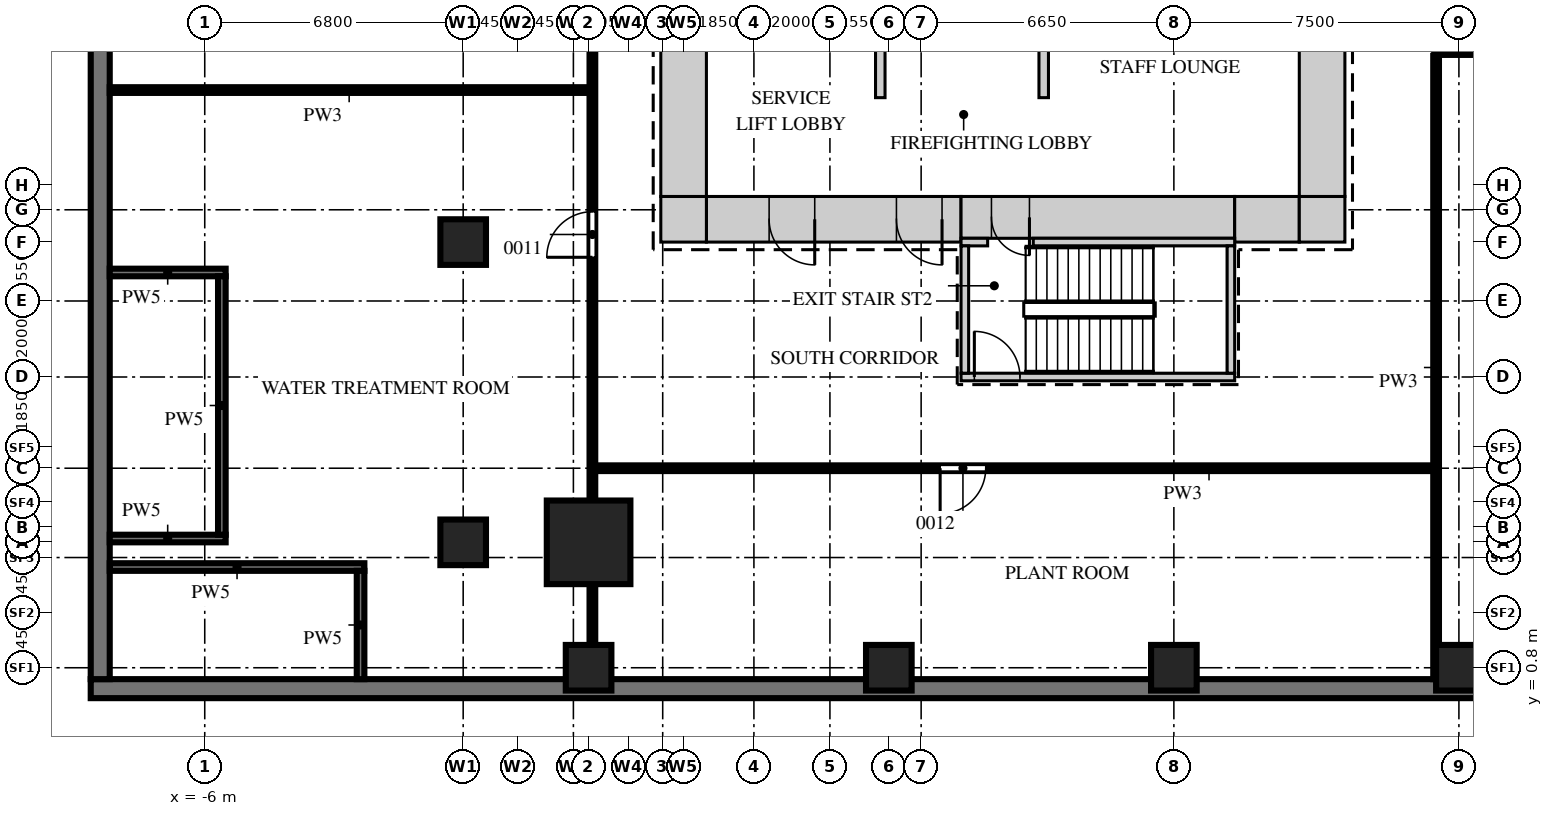
"""IFC4 building model, lengths in metres.
Left out: names, types, materials, properties, quantities, classifications, styles, units other than length and angle.
Written with IfcOpenShell. Run it as: python <this file> out.ifc"""

import sys

from ifc_helpers import new_model, si_unit, direction, frame, frame_2d, origin, origin_2d, place, context, subcontext, project, spatial, rectangle, extrude, source, transform, mapped, element, fill, save


model = new_model("IFC4")
c1 = context("Model", 3, precision=1e-05, world=origin(), true_north=direction((0.0, 1.0)))
c2 = subcontext(c1, "Body", "Model", "MODEL_VIEW")
j1 = project(units=[si_unit("LENGTHUNIT", "METRE"), si_unit("PLANEANGLEUNIT", "RADIAN")], contexts=[c1])
p1 = place(None, origin())
s1 = spatial("IfcSite", under=j1, at=p1, CompositionType="ELEMENT")
p2 = place(p1, origin())
s2 = spatial("IfcBuilding", under=s1, at=p2, CompositionType="ELEMENT")
p3 = place(p2, frame((0.0, 0.0, -9.0)))
s3 = spatial("IfcBuildingStorey", under=s2, at=p3, CompositionType="ELEMENT", Elevation=-9.0)
m1 = source(origin(), c2, "Body", "SweptSolid", [
    extrude(rectangle(XDim=6.7, YDim=1.2, at=frame_2d((3.35, 0.0))), origin(), (0.0, 0.0, 1.0), 4.2),
])
p4 = place(p3, frame((7.2, 12.6, 0.0), z_axis=(0.0, 0.0, 1.0), x_axis=(1.0, 0.0, 0.0)))
e1 = element("IfcWall", 1, at=p4, inside=s3, PredefinedType="SHEAR", context=c2, shape_type="MappedRepresentation", body=[
    mapped(m1, transform((0.0, 0.0, 0.0))),
])
m2 = source(origin(), c2, "Body", "SweptSolid", [
    extrude(rectangle(XDim=1.2, YDim=2.1, at=frame_2d((0.6, 1.05))), frame((0.0, 0.61, 0.0), z_axis=(0.0, -1.0, 0.0), x_axis=(1.0, 0.0, 0.0)), (0.0, 0.0, 1.0), 1.22),
])
p5 = place(p4, frame((5.0, 0.0, 0.0)))
e2 = element("IfcOpeningElement", 2, at=p5, cuts=e1, PredefinedType="OPENING", context=c2, shape_type="MappedRepresentation", body=[
    mapped(m2, transform((0.0, 0.0, 0.0))),
])
p6 = place(p4, frame((1.65, 0.0, 0.0)))
e3 = element("IfcOpeningElement", 3, at=p6, cuts=e1, PredefinedType="OPENING", context=c2, shape_type="MappedRepresentation", body=[
    mapped(m2, transform((0.0, 0.0, 0.0))),
])
m3 = source(origin(), c2, "Body", "SweptSolid", [
    extrude(rectangle(XDim=7.2, YDim=1.1, at=frame_2d((3.6, 0.0))), origin(), (0.0, 0.0, 1.0), 4.2),
])
p7 = place(p3, frame((13.9, 12.65, 0.0), z_axis=(0.0, 0.0, 1.0), x_axis=(1.0, 0.0, 0.0)))
e4 = element("IfcWall", 4, at=p7, inside=s3, PredefinedType="SHEAR", context=c2, shape_type="MappedRepresentation", body=[
    mapped(m3, transform((0.0, 0.0, 0.0))),
])
m4 = source(origin(), c2, "Body", "SweptSolid", [
    extrude(rectangle(XDim=1.0, YDim=2.1, at=frame_2d((0.5, 1.05))), frame((0.0, 0.56, 0.0), z_axis=(0.0, -1.0, 0.0), x_axis=(1.0, 0.0, 0.0)), (0.0, 0.0, 1.0), 1.12),
])
p8 = place(p7, frame((0.8, 0.0, 0.0)))
e5 = element("IfcOpeningElement", 5, at=p8, cuts=e4, PredefinedType="OPENING", context=c2, shape_type="MappedRepresentation", body=[
    mapped(m4, transform((0.0, 0.0, 0.0))),
])
m5 = source(origin(), c2, "Body", "SweptSolid", [
    extrude(rectangle(XDim=1.7, YDim=1.2, at=frame_2d((0.85, 0.0))), origin(), (0.0, 0.0, 1.0), 4.2),
])
p9 = place(p3, frame((21.1, 12.6, 0.0), z_axis=(0.0, 0.0, 1.0), x_axis=(1.0, 0.0, 0.0)))
e6 = element("IfcWall", 6, at=p9, inside=s3, PredefinedType="SHEAR", context=c2, shape_type="MappedRepresentation", body=[
    mapped(m5, transform((0.0, 0.0, 0.0))),
])
m6 = source(origin(), c2, "Body", "SweptSolid", [
    extrude(rectangle(XDim=1.2, YDim=1.2, at=frame_2d((0.6, 0.0))), origin(), (0.0, 0.0, 1.0), 4.2),
])
for number, where, z_axis, x_axis in (
    (7, (22.8, 12.6, 0.0), (0.0, 0.0, 1.0), (1.0, 0.0, 0.0)),
    (8, (6.0, 12.6, 0.0), (0.0, 0.0, 1.0), (1.0, 0.0, 0.0)),
):
    element("IfcWall", number, at=place(p3, frame(where, z_axis=z_axis, x_axis=x_axis)), inside=s3, PredefinedType="SHEAR", context=c2, shape_type="MappedRepresentation", body=[
        mapped(m6, transform((0.0, 0.0, 0.0))),
    ])
m7 = source(origin(), c2, "Body", "SweptSolid", [
    extrude(rectangle(XDim=27.6, YDim=1.2, at=frame_2d((13.8, 0.0))), origin(), (0.0, 0.0, 1.0), 4.2),
])
p10 = place(p3, frame((23.4, 13.2, 0.0), z_axis=(0.0, 0.0, 1.0), x_axis=(0.0, 1.0, 0.0)))
e9 = element("IfcWall", 9, at=p10, inside=s3, PredefinedType="SHEAR", context=c2, shape_type="MappedRepresentation", body=[
    mapped(m7, transform((0.0, 0.0, 0.0))),
])
p11 = place(p10, frame((12.15, 0.0, 0.0)))
e10 = element("IfcOpeningElement", 10, at=p11, cuts=e9, PredefinedType="OPENING", context=c2, shape_type="MappedRepresentation", body=[
    mapped(m2, transform((0.0, 0.0, 0.0))),
])
m8 = source(origin(), c2, "Body", "SweptSolid", [
    extrude(rectangle(XDim=0.9, YDim=2.1, at=frame_2d((0.45, 1.05))), frame((0.0, 0.61, 0.0), z_axis=(0.0, -1.0, 0.0), x_axis=(1.0, 0.0, 0.0)), (0.0, 0.0, 1.0), 1.22),
])
p12 = place(p10, frame((4.4, 0.0, 0.0)))
e11 = element("IfcOpeningElement", 11, at=p12, cuts=e9, PredefinedType="OPENING", context=c2, shape_type="MappedRepresentation", body=[
    mapped(m8, transform((0.0, 0.0, 0.0))),
])
p13 = place(p3, frame((6.6, 13.2, 0.0), z_axis=(0.0, 0.0, 1.0), x_axis=(0.0, 1.0, 0.0)))
e12 = element("IfcWall", 12, at=p13, inside=s3, PredefinedType="SHEAR", context=c2, shape_type="MappedRepresentation", body=[
    mapped(m7, transform((0.0, 0.0, 0.0))),
])
m9 = source(origin(), c2, "Body", "SweptSolid", [
    extrude(rectangle(XDim=0.7, YDim=0.2, at=frame_2d((0.35, 0.0))), origin(), (0.0, 0.0, 1.0), 4.2),
])
p14 = place(p3, frame((13.9, 12.0, 0.0), z_axis=(0.0, 0.0, 1.0), x_axis=(1.0, 0.0, 0.0)))
e13 = element("IfcWall", 13, at=p14, inside=s3, PredefinedType="SHEAR", context=c2, shape_type="MappedRepresentation", body=[
    mapped(m9, transform((0.0, 0.0, 0.0))),
])
m10 = source(origin(), c2, "Body", "SweptSolid", [
    extrude(rectangle(XDim=5.3, YDim=0.2, at=frame_2d((2.65, 0.0))), origin(), (0.0, 0.0, 1.0), 4.2),
])
p15 = place(p3, frame((15.8, 12.0, 0.0), z_axis=(0.0, 0.0, 1.0), x_axis=(1.0, 0.0, 0.0)))
e14 = element("IfcWall", 14, at=p15, inside=s3, PredefinedType="SHEAR", context=c2, shape_type="MappedRepresentation", body=[
    mapped(m10, transform((0.0, 0.0, 0.0))),
])
m11 = source(origin(), c2, "Body", "SweptSolid", [
    extrude(rectangle(XDim=7.2, YDim=0.2, at=frame_2d((3.6, 0.0))), origin(), (0.0, 0.0, 1.0), 4.2),
])
p16 = place(p3, frame((13.9, 8.45, 0.0), z_axis=(0.0, 0.0, 1.0), x_axis=(1.0, 0.0, 0.0)))
e15 = element("IfcWall", 15, at=p16, inside=s3, PredefinedType="SHEAR", context=c2, shape_type="MappedRepresentation", body=[
    mapped(m11, transform((0.0, 0.0, 0.0))),
])
m12 = source(origin(), c2, "Body", "SweptSolid", [
    extrude(rectangle(XDim=1.2, YDim=2.1, at=frame_2d((0.6, 1.05))), frame((0.0, 0.11, 0.0), z_axis=(0.0, -1.0, 0.0), x_axis=(1.0, 0.0, 0.0)), (0.0, 0.0, 1.0), 0.22),
])
p17 = place(p16, frame((0.35, 0.0, 0.0)))
e16 = element("IfcOpeningElement", 16, at=p17, cuts=e15, PredefinedType="OPENING", context=c2, shape_type="MappedRepresentation", body=[
    mapped(m12, transform((0.0, 0.0, 0.0))),
])
m13 = source(origin(), c2, "Body", "SweptSolid", [
    extrude(rectangle(XDim=3.35, YDim=0.2, at=frame_2d((1.675, 0.0))), origin(), (0.0, 0.0, 1.0), 4.2),
])
for number, where, z_axis, x_axis in (
    (17, (21.0, 8.55, 0.0), (0.0, 0.0, 1.0), (0.0, 1.0, 0.0)),
    (18, (14.0, 8.55, 0.0), (0.0, 0.0, 1.0), (0.0, 1.0, 0.0)),
):
    element("IfcWall", number, at=place(p3, frame(where, z_axis=z_axis, x_axis=x_axis)), inside=s3, PredefinedType="SHEAR", context=c2, shape_type="MappedRepresentation", body=[
        mapped(m13, transform((0.0, 0.0, 0.0))),
    ])
m14 = source(origin(), c2, "Body", "SweptSolid", [
    extrude(rectangle(XDim=3.4, YDim=0.25, at=frame_2d((1.7, 0.0))), origin(), (0.0, 0.0, 1.0), 4.2),
])
for number, where, z_axis, x_axis in (
    (19, (16.075, 15.8, 0.0), (0.0, 0.0, 1.0), (0.0, 1.0, 0.0)),
    (20, (11.775, 15.8, 0.0), (0.0, 0.0, 1.0), (0.0, 1.0, 0.0)),
):
    element("IfcWall", number, at=place(p3, frame(where, z_axis=z_axis, x_axis=x_axis)), inside=s3, PredefinedType="STANDARD", context=c2, shape_type="MappedRepresentation", body=[
        mapped(m14, transform((0.0, 0.0, 0.0))),
    ])
m15 = source(origin(), c2, "Body", "SweptSolid", [
    extrude(rectangle(XDim=90.0, YDim=0.5, at=frame_2d((45.0, 0.0))), origin(), (0.0, 0.0, 1.0), 4.2),
])
p18 = place(p3, frame((-9.0, 0.25, 0.0), z_axis=(0.0, 0.0, 1.0), x_axis=(1.0, 0.0, 0.0)))
e21 = element("IfcWall", 21, at=p18, inside=s3, PredefinedType="STANDARD", context=c2, shape_type="MappedRepresentation", body=[
    mapped(m15, transform((0.0, 0.0, 0.0))),
])
m16 = source(origin(), c2, "Body", "SweptSolid", [
    extrude(rectangle(XDim=53.0, YDim=0.5, at=frame_2d((26.5, 0.0))), origin(), (0.0, 0.0, 1.0), 4.2),
])
p19 = place(p3, frame((-8.75, 0.5, 0.0), z_axis=(0.0, 0.0, 1.0), x_axis=(0.0, 1.0, 0.0)))
e22 = element("IfcWall", 22, at=p19, inside=s3, PredefinedType="STANDARD", context=c2, shape_type="MappedRepresentation", body=[
    mapped(m16, transform((0.0, 0.0, 0.0))),
])
m17 = source(origin(), c2, "Body", "SweptSolid", [
    extrude(rectangle(XDim=2.2, YDim=2.2, at=origin_2d()), origin(), (0.0, 0.0, 1.0), 4.5),
])
p20 = place(p3, frame((4.1, 4.1, 0.0), z_axis=(0.0, 0.0, 1.0), x_axis=(1.0, 0.0, 0.0)))
e23 = element("IfcColumn", 23, at=p20, inside=s3, PredefinedType="COLUMN", context=c2, shape_type="MappedRepresentation", body=[
    mapped(m17, transform((0.0, 0.0, 0.0))),
])
m18 = source(origin(), c2, "Body", "SweptSolid", [
    extrude(rectangle(XDim=1.2, YDim=1.2, at=origin_2d()), origin(), (0.0, 0.0, 1.0), 4.2),
])
for number, where, z_axis, x_axis in (
    (24, (4.1, 0.8, 0.0), (0.0, 0.0, 1.0), (1.0, 0.0, 0.0)),
    (25, (12.0, 0.8, 0.0), (0.0, 0.0, 1.0), (1.0, 0.0, 0.0)),
    (26, (19.5, 0.8, 0.0), (0.0, 0.0, 1.0), (1.0, 0.0, 0.0)),
    (27, (27.0, 0.8, 0.0), (0.0, 0.0, 1.0), (1.0, 0.0, 0.0)),
    (28, (0.8, 4.1, 0.0), (0.0, 0.0, 1.0), (1.0, 0.0, 0.0)),
    (29, (0.8, 12.0, 0.0), (0.0, 0.0, 1.0), (1.0, 0.0, 0.0)),
):
    element("IfcColumn", number, at=place(p3, frame(where, z_axis=z_axis, x_axis=x_axis)), inside=s3, PredefinedType="COLUMN", context=c2, shape_type="MappedRepresentation", body=[
        mapped(m18, transform((0.0, 0.0, 0.0))),
    ])
m19 = source(origin(), c2, "Body", "SweptSolid", [
    extrude(rectangle(XDim=53.0, YDim=0.15, at=frame_2d((26.5, 0.0))), origin(), (0.0, 0.0, 1.0), 4.2),
])
p21 = place(p3, frame((4.2, 0.5, 0.0), z_axis=(0.0, 0.0, 1.0), x_axis=(0.0, 1.0, 0.0)))
e30 = element("IfcWall", 30, at=p21, inside=s3, PredefinedType="PARTITIONING", context=c2, shape_type="MappedRepresentation", body=[
    mapped(m19, transform((0.0, 0.0, 0.0))),
])
m20 = source(origin(), c2, "Body", "SweptSolid", [
    extrude(rectangle(XDim=1.2, YDim=2.1, at=frame_2d((0.6, 1.05))), frame((0.0, 0.085, 0.0), z_axis=(0.0, -1.0, 0.0), x_axis=(1.0, 0.0, 0.0)), (0.0, 0.0, 1.0), 0.17),
])
p22 = place(p21, frame((11.1, 0.0, 0.0)))
e31 = element("IfcOpeningElement", 31, at=p22, cuts=e30, PredefinedType="OPENING", context=c2, shape_type="MappedRepresentation", body=[
    mapped(m20, transform((0.0, 0.0, 0.0))),
])
p23 = place(p21, frame((23.9, 0.0, 0.0)))
e32 = element("IfcOpeningElement", 32, at=p23, cuts=e30, PredefinedType="OPENING", context=c2, shape_type="MappedRepresentation", body=[
    mapped(m20, transform((0.0, 0.0, 0.0))),
])
p24 = place(p21, frame((38.7, 0.0, 0.0)))
e33 = element("IfcOpeningElement", 33, at=p24, cuts=e30, PredefinedType="OPENING", context=c2, shape_type="MappedRepresentation", body=[
    mapped(m20, transform((0.0, 0.0, 0.0))),
])
m21 = source(origin(), c2, "Body", "SweptSolid", [
    extrude(rectangle(XDim=16.4, YDim=0.15, at=frame_2d((8.2, 0.0))), origin(), (0.0, 0.0, 1.0), 4.2),
])
p25 = place(p3, frame((26.4, 0.5, 0.0), z_axis=(0.0, 0.0, 1.0), x_axis=(0.0, 1.0, 0.0)))
e34 = element("IfcWall", 34, at=p25, inside=s3, PredefinedType="PARTITIONING", context=c2, shape_type="MappedRepresentation", body=[
    mapped(m21, transform((0.0, 0.0, 0.0))),
])
m22 = source(origin(), c2, "Body", "SweptSolid", [
    extrude(rectangle(XDim=22.0, YDim=0.15, at=frame_2d((11.0, 0.0))), origin(), (0.0, 0.0, 1.0), 4.2),
])
p26 = place(p3, frame((4.3, 6.05, 0.0), z_axis=(0.0, 0.0, 1.0), x_axis=(1.0, 0.0, 0.0)))
e35 = element("IfcWall", 35, at=p26, inside=s3, PredefinedType="PARTITIONING", context=c2, shape_type="MappedRepresentation", body=[
    mapped(m22, transform((0.0, 0.0, 0.0))),
])
p27 = place(p26, frame((9.05, 0.0, 0.0)))
e36 = element("IfcOpeningElement", 36, at=p27, cuts=e35, PredefinedType="OPENING", context=c2, shape_type="MappedRepresentation", body=[
    mapped(m20, transform((0.0, 0.0, 0.0))),
])
m23 = source(origin(), c2, "Body", "SweptSolid", [
    extrude(rectangle(XDim=12.6, YDim=0.15, at=frame_2d((6.3, 0.0))), origin(), (0.0, 0.0, 1.0), 4.2),
])
p28 = place(p3, frame((-8.5, 16.0, 0.0), z_axis=(0.0, 0.0, 1.0), x_axis=(1.0, 0.0, 0.0)))
e37 = element("IfcWall", 37, at=p28, inside=s3, PredefinedType="PARTITIONING", context=c2, shape_type="MappedRepresentation", body=[
    mapped(m23, transform((0.0, 0.0, 0.0))),
])
m24 = source(origin(), c2, "Body", "SweptSolid", [
    extrude(rectangle(XDim=54.15, YDim=0.15, at=frame_2d((27.075, 0.0))), origin(), (0.0, 0.0, 1.0), 4.2),
])
p29 = place(p3, frame((26.35, 17.0, 0.0), z_axis=(0.0, 0.0, 1.0), x_axis=(1.0, 0.0, 0.0)))
e38 = element("IfcWall", 38, at=p29, inside=s3, PredefinedType="PARTITIONING", context=c2, shape_type="MappedRepresentation", body=[
    mapped(m24, transform((0.0, 0.0, 0.0))),
])
p30 = place(p29, frame((6.25, 0.0, 0.0)))
e39 = element("IfcOpeningElement", 39, at=p30, cuts=e38, PredefinedType="OPENING", context=c2, shape_type="MappedRepresentation", body=[
    mapped(m20, transform((0.0, 0.0, 0.0))),
])
p31 = place(p29, frame((19.05, 0.0, 0.0)))
e40 = element("IfcOpeningElement", 40, at=p31, cuts=e38, PredefinedType="OPENING", context=c2, shape_type="MappedRepresentation", body=[
    mapped(m20, transform((0.0, 0.0, 0.0))),
])
p32 = place(p29, frame((31.05, 0.0, 0.0)))
e41 = element("IfcOpeningElement", 41, at=p32, cuts=e38, PredefinedType="OPENING", context=c2, shape_type="MappedRepresentation", body=[
    mapped(m20, transform((0.0, 0.0, 0.0))),
])
m25 = source(origin(), c2, "Body", "SweptSolid", [
    extrude(rectangle(XDim=0.9, YDim=2.1, at=frame_2d((0.45, 1.05))), frame((0.0, 0.085, 0.0), z_axis=(0.0, -1.0, 0.0), x_axis=(1.0, 0.0, 0.0)), (0.0, 0.0, 1.0), 0.17),
])
p33 = place(p29, frame((39.85, 0.0, 0.0)))
e42 = element("IfcOpeningElement", 42, at=p33, cuts=e38, PredefinedType="OPENING", context=c2, shape_type="MappedRepresentation", body=[
    mapped(m25, transform((0.0, 0.0, 0.0))),
])
p34 = place(p29, frame((48.2, 0.0, 0.0)))
e43 = element("IfcOpeningElement", 43, at=p34, cuts=e38, PredefinedType="OPENING", context=c2, shape_type="MappedRepresentation", body=[
    mapped(m20, transform((0.0, 0.0, 0.0))),
])
m26 = source(origin(), c2, "Body", "SweptSolid", [
    extrude(rectangle(XDim=6.7, YDim=0.2, at=frame_2d((3.35, 0.0))), origin(), (0.0, 0.0, 1.0), 4.2),
])
p35 = place(p3, frame((-8.5, 3.45, 0.0), z_axis=(0.0, 0.0, 1.0), x_axis=(1.0, 0.0, 0.0)))
e44 = element("IfcWall", 44, at=p35, inside=s3, PredefinedType="PARTITIONING", context=c2, shape_type="MappedRepresentation", body=[
    mapped(m26, transform((0.0, 0.0, 0.0))),
])
m27 = source(origin(), c2, "Body", "SweptSolid", [
    extrude(rectangle(XDim=2.85, YDim=0.2, at=frame_2d((1.425, 0.0))), origin(), (0.0, 0.0, 1.0), 4.2),
])
p36 = place(p3, frame((-1.9, 0.5, 0.0), z_axis=(0.0, 0.0, 1.0), x_axis=(0.0, 1.0, 0.0)))
e45 = element("IfcWall", 45, at=p36, inside=s3, PredefinedType="PARTITIONING", context=c2, shape_type="MappedRepresentation", body=[
    mapped(m27, transform((0.0, 0.0, 0.0))),
])
m28 = source(origin(), c2, "Body", "SweptSolid", [
    extrude(rectangle(XDim=3.05, YDim=0.2, at=frame_2d((1.525, 0.0))), origin(), (0.0, 0.0, 1.0), 4.2),
])
for number, where, z_axis, x_axis in (
    (46, (-8.5, 4.2, 0.0), (0.0, 0.0, 1.0), (1.0, 0.0, 0.0)),
    (47, (-8.5, 11.2, 0.0), (0.0, 0.0, 1.0), (1.0, 0.0, 0.0)),
):
    element("IfcWall", number, at=place(p3, frame(where, z_axis=z_axis, x_axis=x_axis)), inside=s3, PredefinedType="PARTITIONING", context=c2, shape_type="MappedRepresentation", body=[
        mapped(m28, transform((0.0, 0.0, 0.0))),
    ])
m29 = source(origin(), c2, "Body", "SweptSolid", [
    extrude(rectangle(XDim=6.8, YDim=0.2, at=frame_2d((3.4, 0.0))), origin(), (0.0, 0.0, 1.0), 4.2),
])
p37 = place(p3, frame((-5.55, 4.3, 0.0), z_axis=(0.0, 0.0, 1.0), x_axis=(0.0, 1.0, 0.0)))
e48 = element("IfcWall", 48, at=p37, inside=s3, PredefinedType="PARTITIONING", context=c2, shape_type="MappedRepresentation", body=[
    mapped(m29, transform((0.0, 0.0, 0.0))),
])
m30 = source(origin(), c2, "Body", "SweptSolid", [
    extrude(rectangle(XDim=1.2, YDim=2.1, at=frame_2d((0.6, 1.05))), frame((0.0, 0.55, 0.0), z_axis=(0.0, -1.0, 0.0), x_axis=(1.0, 0.0, 0.0)), (0.0, 0.0, 1.0), 1.1),
])
p38 = place(p5, origin())
e49 = element("IfcDoor", 49, at=p38, inside=s3, OperationType="SINGLE_SWING_RIGHT", PredefinedType="DOOR", context=c2, shape_type="MappedRepresentation", body=[
    mapped(m30, transform((0.0, 0.0, 0.0))),
])
fill(e2, e49)
p39 = place(p6, origin())
e50 = element("IfcDoor", 50, at=p39, inside=s3, OperationType="SINGLE_SWING_RIGHT", PredefinedType="DOOR", context=c2, shape_type="MappedRepresentation", body=[
    mapped(m30, transform((0.0, 0.0, 0.0))),
])
fill(e3, e50)
m31 = source(origin(), c2, "Body", "SweptSolid", [
    extrude(rectangle(XDim=1.0, YDim=2.1, at=frame_2d((0.5, 1.05))), frame((0.0, 0.5, 0.0), z_axis=(0.0, -1.0, 0.0), x_axis=(1.0, 0.0, 0.0)), (0.0, 0.0, 1.0), 1.0),
])
p40 = place(p8, origin())
e51 = element("IfcDoor", 51, at=p40, inside=s3, OperationType="SINGLE_SWING_RIGHT", PredefinedType="DOOR", context=c2, shape_type="MappedRepresentation", body=[
    mapped(m31, transform((0.0, 0.0, 0.0))),
])
fill(e5, e51)
m32 = source(origin(), c2, "Body", "SweptSolid", [
    extrude(rectangle(XDim=1.2, YDim=2.1, at=frame_2d((0.6, 1.05))), frame((0.0, 0.025, 0.0), z_axis=(0.0, -1.0, 0.0), x_axis=(1.0, 0.0, 0.0)), (0.0, 0.0, 1.0), 0.05),
])
p41 = place(p22, origin())
e52 = element("IfcDoor", 52, at=p41, inside=s3, OperationType="SINGLE_SWING_RIGHT", PredefinedType="DOOR", context=c2, shape_type="MappedRepresentation", body=[
    mapped(m32, transform((0.0, 0.0, 0.0))),
])
fill(e31, e52)
p42 = place(p27, origin())
e53 = element("IfcDoor", 53, at=p42, inside=s3, OperationType="SINGLE_SWING_LEFT", PredefinedType="DOOR", context=c2, shape_type="MappedRepresentation", body=[
    mapped(m32, transform((0.0, 0.0, 0.0))),
])
fill(e36, e53)
p43 = place(p17, origin())
e54 = element("IfcDoor", 54, at=p43, inside=s3, OperationType="SINGLE_SWING_RIGHT", PredefinedType="DOOR", context=c2, shape_type="MappedRepresentation", body=[
    mapped(m32, transform((0.0, 0.0, 0.0))),
])
fill(e16, e54)
save(model, sys.argv[1])
